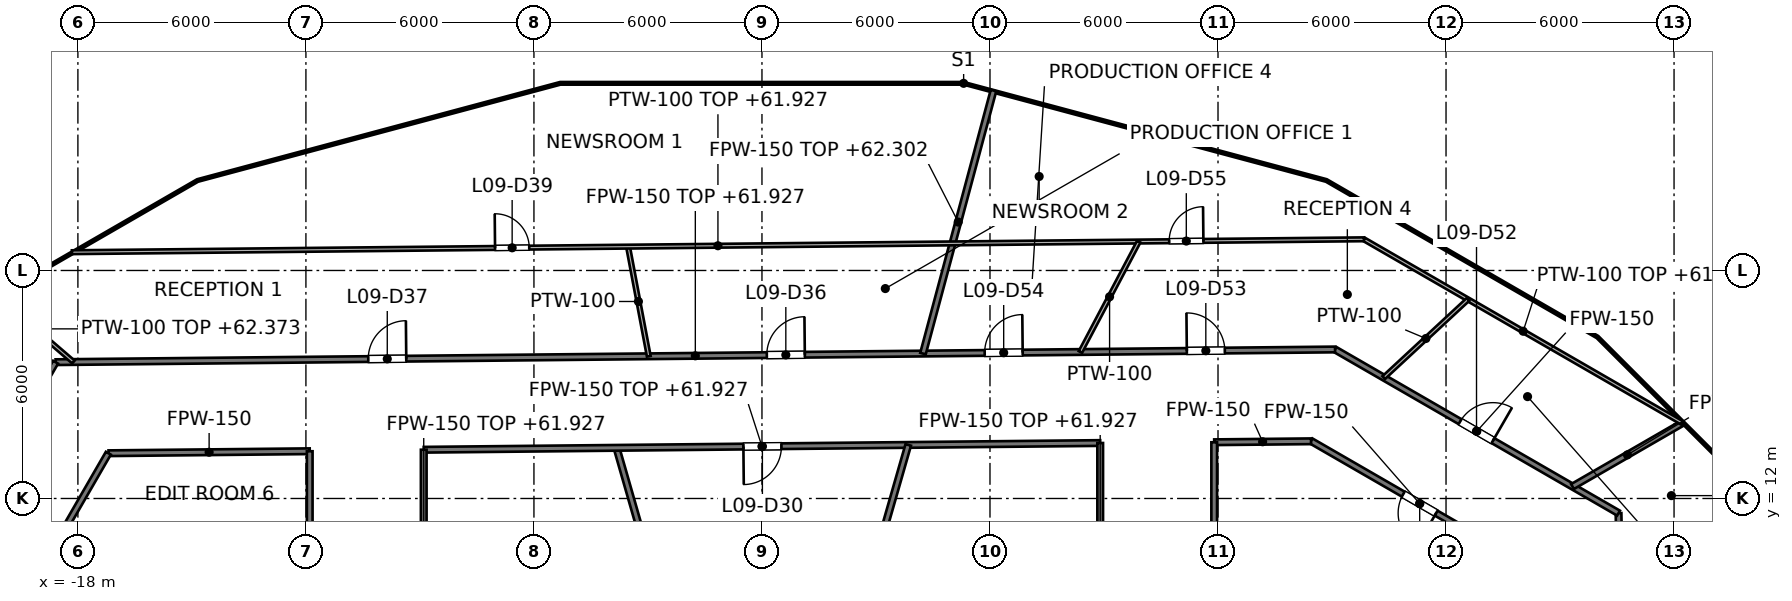
"""IFC4 building model, lengths in metres.
Left out: names, types, materials, properties, quantities, classifications, styles, units other than length and angle.
Written with IfcOpenShell. Run it as: python <this file> out.ifc"""

import sys

from ifc_helpers import new_model, si_unit, direction, frame, frame_2d, origin, place, context, subcontext, project, spatial, rectangle, extrude, element, fill, save


model = new_model("IFC4")
c1 = context("Model", 3, precision=1e-05, world=origin(), true_north=direction((0.0, 1.0)))
c2 = subcontext(c1, "Body", "Model", "MODEL_VIEW")
j1 = project(units=[si_unit("LENGTHUNIT", "METRE"), si_unit("PLANEANGLEUNIT", "RADIAN")], contexts=[c1])
p1 = place(None, origin())
s1 = spatial("IfcSite", under=j1, at=p1, CompositionType="ELEMENT")
p2 = place(p1, origin())
s2 = spatial("IfcBuilding", under=s1, at=p2, CompositionType="ELEMENT")
p3 = place(p2, frame((0.0, 0.0, 58.8)))
s3 = spatial("IfcBuildingStorey", under=s2, at=p3, CompositionType="ELEMENT", Elevation=58.8)
p4 = place(p3, frame((22.539, 11.615, 0.0), z_axis=(0.0, 0.0, 1.0), x_axis=(0.020626332176, -0.99978725458, 0.0)))
e1 = element("IfcWall", 1, at=p4, inside=s3, PredefinedType="PARTITIONING", context=c2, shape_type="SweptSolid", body=[
    extrude(rectangle(XDim=19.66, YDim=0.15, at=frame_2d((9.83, 0.0))), origin(), (0.0, 0.0, 1.0), 3.127),
])
p5 = place(p4, frame((9.33, 0.0, 0.0)))
e2 = element("IfcOpeningElement", 2, at=p5, cuts=e1, PredefinedType="OPENING", context=c2, shape_type="SweptSolid", body=[
    extrude(rectangle(XDim=1.0, YDim=2.1, at=frame_2d((0.5, 1.05))), frame((0.0, 0.075, 0.0), z_axis=(0.0, -1.0, 0.0), x_axis=(1.0, 0.0, 0.0)), (0.0, 0.0, 1.0), 0.15),
])
p6 = place(p3, frame((-3.827, 13.333, 0.0), z_axis=(0.0, 0.0, 1.0), x_axis=(0.275935525478, -0.961176147113, 0.0)))
e3 = element("IfcWall", 3, at=p6, inside=s3, PredefinedType="PARTITIONING", context=c2, shape_type="SweptSolid", body=[
    extrude(rectangle(XDim=5.548, YDim=0.15, at=frame_2d((2.774, 0.0))), origin(), (0.0, 0.0, 1.0), 4.05),
])
p7 = place(p3, frame((14.448, 13.515, 0.0), z_axis=(0.0, 0.0, 1.0), x_axis=(0.866057537452, -0.499944338725, 0.0)))
e4 = element("IfcWall", 4, at=p7, inside=s3, PredefinedType="PARTITIONING", context=c2, shape_type="SweptSolid", body=[
    extrude(rectangle(XDim=6.604, YDim=0.15, at=frame_2d((3.302, 0.0))), origin(), (0.0, 0.0, 1.0), 3.195),
])
p8 = place(p7, frame((2.801, 0.0, 0.0)))
e5 = element("IfcOpeningElement", 5, at=p8, cuts=e4, PredefinedType="OPENING", context=c2, shape_type="SweptSolid", body=[
    extrude(rectangle(XDim=1.0, YDim=2.1, at=frame_2d((0.5, 1.05))), frame((0.0, 0.075, 0.0), z_axis=(0.0, -1.0, 0.0), x_axis=(1.0, 0.0, 0.0)), (0.0, 0.0, 1.0), 0.15),
])
p9 = place(p3, frame((15.08, 15.921, 0.0), z_axis=(0.0, 0.0, 1.0), x_axis=(0.866045387442, -0.499965385693, 0.0)))
e6 = element("IfcWall", 6, at=p9, inside=s3, PredefinedType="PARTITIONING", context=c2, shape_type="SweptSolid", body=[
    extrude(rectangle(XDim=8.612, YDim=0.15, at=frame_2d((4.306, 0.0))), origin(), (0.0, 0.0, 1.0), 3.195),
])
p10 = place(p9, frame((3.798, 0.0, 0.0)))
e7 = element("IfcOpeningElement", 7, at=p10, cuts=e6, PredefinedType="OPENING", context=c2, shape_type="SweptSolid", body=[
    extrude(rectangle(XDim=1.0, YDim=2.1, at=frame_2d((0.5, 1.05))), frame((0.0, 0.075, 0.0), z_axis=(0.0, -1.0, 0.0), x_axis=(1.0, 0.0, 0.0)), (0.0, 0.0, 1.0), 0.15),
])
p11 = place(p3, frame((-17.194, 13.191, 0.0), z_axis=(0.0, 0.0, 1.0), x_axis=(0.999950394899, 0.009960308291, 0.0)))
e8 = element("IfcWall", 8, at=p11, inside=s3, PredefinedType="PARTITIONING", context=c2, shape_type="SweptSolid", body=[
    extrude(rectangle(XDim=5.294, YDim=0.15, at=frame_2d((2.647, 0.0))), origin(), (0.0, 0.0, 1.0), 3.195),
])
p12 = place(p3, frame((-8.9, 13.282, 0.0), z_axis=(0.0, 0.0, 1.0), x_axis=(0.999950697987, 0.009929833562, 0.0)))
e9 = element("IfcWall", 9, at=p12, inside=s3, PredefinedType="PARTITIONING", context=c2, shape_type="SweptSolid", body=[
    extrude(rectangle(XDim=17.801, YDim=0.15, at=frame_2d((8.9, 0.0))), origin(), (0.0, 0.0, 1.0), 3.127),
])
p13 = place(p12, frame((8.412, 0.0, 0.0)))
e10 = element("IfcOpeningElement", 10, at=p13, cuts=e9, PredefinedType="OPENING", context=c2, shape_type="SweptSolid", body=[
    extrude(rectangle(XDim=1.0, YDim=2.1, at=frame_2d((0.5, 1.05))), frame((0.0, 0.075, 0.0), z_axis=(0.0, -1.0, 0.0), x_axis=(1.0, 0.0, 0.0)), (0.0, 0.0, 1.0), 0.15),
])
p14 = place(p3, frame((11.9, 13.48, 0.0), z_axis=(0.0, 0.0, 1.0), x_axis=(0.999950357576, 0.009964054536, 0.0)))
e11 = element("IfcWall", 11, at=p14, inside=s3, PredefinedType="PARTITIONING", context=c2, shape_type="SweptSolid", body=[
    extrude(rectangle(XDim=2.548, YDim=0.15, at=frame_2d((1.274, 0.0))), origin(), (0.0, 0.0, 1.0), 3.195),
])
p15 = place(p3, frame((-18.587, 15.587, 0.0), z_axis=(0.0, 0.0, 1.0), x_axis=(0.99995065417, 0.009934245078, 0.0)))
e12 = element("IfcWall", 12, at=p15, inside=s3, PredefinedType="PARTITIONING", context=c2, shape_type="SweptSolid", body=[
    extrude(rectangle(XDim=33.669, YDim=0.15, at=frame_2d((16.834, 0.0))), origin(), (0.0, 0.0, 1.0), 3.127),
])
p16 = place(p15, frame((18.716, 0.0, 0.0)))
e13 = element("IfcOpeningElement", 13, at=p16, cuts=e12, PredefinedType="OPENING", context=c2, shape_type="SweptSolid", body=[
    extrude(rectangle(XDim=1.0, YDim=2.1, at=frame_2d((0.5, 1.05))), frame((0.0, 0.075, 0.0), z_axis=(0.0, -1.0, 0.0), x_axis=(1.0, 0.0, 0.0)), (0.0, 0.0, 1.0), 0.15),
])
p17 = place(p15, frame((8.228, 0.0, 0.0)))
e14 = element("IfcOpeningElement", 14, at=p17, cuts=e12, PredefinedType="OPENING", context=c2, shape_type="SweptSolid", body=[
    extrude(rectangle(XDim=1.0, YDim=2.1, at=frame_2d((0.5, 1.05))), frame((0.0, 0.075, 0.0), z_axis=(0.0, -1.0, 0.0), x_axis=(1.0, 0.0, 0.0)), (0.0, 0.0, 1.0), 0.15),
])
p18 = place(p15, frame((29.768, 0.0, 0.0)))
e15 = element("IfcOpeningElement", 15, at=p18, cuts=e12, PredefinedType="OPENING", context=c2, shape_type="SweptSolid", body=[
    extrude(rectangle(XDim=1.0, YDim=2.1, at=frame_2d((0.5, 1.05))), frame((0.0, 0.075, 0.0), z_axis=(0.0, -1.0, 0.0), x_axis=(1.0, 0.0, 0.0)), (0.0, 0.0, 1.0), 0.15),
])
p19 = place(p15, frame((24.449, 0.0, 0.0)))
e16 = element("IfcOpeningElement", 16, at=p19, cuts=e12, PredefinedType="OPENING", context=c2, shape_type="SweptSolid", body=[
    extrude(rectangle(XDim=1.0, YDim=2.1, at=frame_2d((0.5, 1.05))), frame((0.0, 0.075, 0.0), z_axis=(0.0, -1.0, 0.0), x_axis=(1.0, 0.0, 0.0)), (0.0, 0.0, 1.0), 0.15),
])
p20 = place(p3, frame((21.328, 12.314, 0.0), z_axis=(0.0, 0.0, 1.0), x_axis=(0.865983350263, 0.500072831762, 0.0)))
e17 = element("IfcWall", 17, at=p20, inside=s3, PredefinedType="PARTITIONING", context=c2, shape_type="SweptSolid", body=[
    extrude(rectangle(XDim=3.337, YDim=0.15, at=frame_2d((1.669, 0.0))), origin(), (0.0, 0.0, 1.0), 3.276),
])
p21 = place(p3, frame((-20.5, 7.474, 0.0), z_axis=(0.0, 0.0, 1.0), x_axis=(0.500012665616, 0.866018091164, 0.0)))
e18 = element("IfcWall", 18, at=p21, inside=s3, PredefinedType="PARTITIONING", context=c2, shape_type="SweptSolid", body=[
    extrude(rectangle(XDim=6.602, YDim=0.15, at=frame_2d((3.301, 0.0))), origin(), (0.0, 0.0, 1.0), 3.195),
])
p22 = place(p21, frame((2.803, 0.0, 0.0)))
e19 = element("IfcOpeningElement", 19, at=p22, cuts=e18, PredefinedType="OPENING", context=c2, shape_type="SweptSolid", body=[
    extrude(rectangle(XDim=1.0, YDim=2.1, at=frame_2d((0.5, 1.05))), frame((0.0, 0.075, 0.0), z_axis=(0.0, -1.0, 0.0), x_axis=(1.0, 0.0, 0.0)), (0.0, 0.0, 1.0), 0.15),
])
p23 = place(p3, frame((-22.9, 8.117, 0.0), z_axis=(0.0, 0.0, 1.0), x_axis=(0.500017275495, 0.866015429543, 0.0)))
e20 = element("IfcWall", 20, at=p23, inside=s3, PredefinedType="PARTITIONING", context=c2, shape_type="SweptSolid", body=[
    extrude(rectangle(XDim=8.626, YDim=0.15, at=frame_2d((4.313, 0.0))), origin(), (0.0, 0.0, 1.0), 3.195),
])
p24 = place(p23, frame((3.813, 0.0, 0.0)))
e21 = element("IfcOpeningElement", 21, at=p24, cuts=e20, PredefinedType="OPENING", context=c2, shape_type="SweptSolid", body=[
    extrude(rectangle(XDim=1.0, YDim=2.1, at=frame_2d((0.5, 1.05))), frame((0.0, 0.075, 0.0), z_axis=(0.0, -1.0, 0.0), x_axis=(1.0, 0.0, 0.0)), (0.0, 0.0, 1.0), 0.15),
])
p25 = place(p3, frame((2.296, 8.0, 0.0), z_axis=(0.0, 0.0, 1.0), x_axis=(0.275958345059, 0.961169595749, 0.0)))
e22 = element("IfcWall", 22, at=p25, inside=s3, PredefinedType="PARTITIONING", context=c2, shape_type="SweptSolid", body=[
    extrude(rectangle(XDim=5.628, YDim=0.15, at=frame_2d((2.814, 0.0))), origin(), (0.0, 0.0, 1.0), 4.05),
])
p26 = place(p3, frame((4.237, 15.813, 0.0), z_axis=(0.0, 0.0, 1.0), x_axis=(0.258845635073, 0.965918701136, 0.0)))
e23 = element("IfcWall", 23, at=p26, inside=s3, PredefinedType="PARTITIONING", context=c2, shape_type="SweptSolid", body=[
    extrude(rectangle(XDim=7.166, YDim=0.15, at=frame_2d((3.583, 0.0))), origin(), (0.0, 0.0, 1.0), 3.502),
])
p27 = place(p3, frame((11.9, 8.0, 0.0), z_axis=(0.0, 0.0, 1.0), x_axis=(0.0, 1.0, 0.0)))
e24 = element("IfcWall", 24, at=p27, inside=s3, PredefinedType="PARTITIONING", context=c2, shape_type="SweptSolid", body=[
    extrude(rectangle(XDim=5.479, YDim=0.15, at=frame_2d((2.74, 0.0))), origin(), (0.0, 0.0, 1.0), 3.195),
])
p28 = place(p3, frame((8.9, 8.0, 0.0), z_axis=(0.0, 0.0, 1.0), x_axis=(0.0, 1.0, 0.0)))
e25 = element("IfcWall", 25, at=p28, inside=s3, PredefinedType="PARTITIONING", context=c2, shape_type="SweptSolid", body=[
    extrude(rectangle(XDim=5.46, YDim=0.15, at=frame_2d((2.73, 0.0))), origin(), (0.0, 0.0, 1.0), 3.127),
])
p29 = place(p28, frame((2.23, 0.0, 0.0)))
e26 = element("IfcOpeningElement", 26, at=p29, cuts=e25, PredefinedType="OPENING", context=c2, shape_type="SweptSolid", body=[
    extrude(rectangle(XDim=1.0, YDim=2.1, at=frame_2d((0.5, 1.05))), frame((0.0, 0.075, 0.0), z_axis=(0.0, -1.0, 0.0), x_axis=(1.0, 0.0, 0.0)), (0.0, 0.0, 1.0), 0.15),
])
p30 = place(p3, frame((-8.9, 8.0, 0.0), z_axis=(0.0, 0.0, 1.0), x_axis=(0.0, 1.0, 0.0)))
e27 = element("IfcWall", 27, at=p30, inside=s3, PredefinedType="PARTITIONING", context=c2, shape_type="SweptSolid", body=[
    extrude(rectangle(XDim=5.283, YDim=0.15, at=frame_2d((2.642, 0.0))), origin(), (0.0, 0.0, 1.0), 3.127),
])
p31 = place(p30, frame((2.142, 0.0, 0.0)))
e28 = element("IfcOpeningElement", 28, at=p31, cuts=e27, PredefinedType="OPENING", context=c2, shape_type="SweptSolid", body=[
    extrude(rectangle(XDim=1.0, YDim=2.1, at=frame_2d((0.5, 1.05))), frame((0.0, 0.075, 0.0), z_axis=(0.0, -1.0, 0.0), x_axis=(1.0, 0.0, 0.0)), (0.0, 0.0, 1.0), 0.15),
])
p32 = place(p3, frame((-11.9, 8.0, 0.0), z_axis=(0.0, 0.0, 1.0), x_axis=(0.0, 1.0, 0.0)))
e29 = element("IfcWall", 29, at=p32, inside=s3, PredefinedType="PARTITIONING", context=c2, shape_type="SweptSolid", body=[
    extrude(rectangle(XDim=5.243, YDim=0.15, at=frame_2d((2.622, 0.0))), origin(), (0.0, 0.0, 1.0), 3.195),
])
p33 = place(p3, frame((-3.524, 18.626, 0.0), z_axis=(0.0, 0.0, 1.0), x_axis=(0.185980649988, -0.982553407113, 0.0)))
e30 = element("IfcWall", 30, at=p33, inside=s3, PredefinedType="PARTITIONING", context=c2, shape_type="SweptSolid", body=[
    extrude(rectangle(XDim=2.935, YDim=0.1, at=frame_2d((1.468, 0.0))), origin(), (0.0, 0.0, 1.0), 4.05),
])
p34 = place(p3, frame((-20.143, 17.335, 0.0), z_axis=(0.0, 0.0, 1.0), x_axis=(0.757945732802, -0.652317611389, 0.0)))
e31 = element("IfcWall", 31, at=p34, inside=s3, PredefinedType="PARTITIONING", context=c2, shape_type="SweptSolid", body=[
    extrude(rectangle(XDim=2.672, YDim=0.1, at=frame_2d((1.336, 0.0))), origin(), (0.0, 0.0, 1.0), 3.573),
])
p35 = place(p3, frame((15.841, 18.819, 0.0), z_axis=(0.0, 0.0, 1.0), x_axis=(0.866064962815, -0.499931475489, 0.0)))
e32 = element("IfcWall", 32, at=p35, inside=s3, PredefinedType="PARTITIONING", context=c2, shape_type="SweptSolid", body=[
    extrude(rectangle(XDim=9.673, YDim=0.1, at=frame_2d((4.836, 0.0))), origin(), (0.0, 0.0, 1.0), 3.195),
])
p36 = place(p3, frame((-18.158, 18.481, 0.0), z_axis=(0.0, 0.0, 1.0), x_axis=(0.999950046819, 0.009995192196, 0.0)))
e33 = element("IfcWall", 33, at=p36, inside=s3, PredefinedType="PARTITIONING", context=c2, shape_type="SweptSolid", body=[
    extrude(rectangle(XDim=34.001, YDim=0.1, at=frame_2d((17.0, 0.0))), origin(), (0.0, 0.0, 1.0), 3.127),
])
p37 = place(p36, frame((11.135, 0.0, 0.0)))
e34 = element("IfcOpeningElement", 34, at=p37, cuts=e33, PredefinedType="OPENING", context=c2, shape_type="SweptSolid", body=[
    extrude(rectangle(XDim=0.9, YDim=2.1, at=frame_2d((0.45, 1.05))), frame((0.0, 0.05, 0.0), z_axis=(0.0, -1.0, 0.0), x_axis=(1.0, 0.0, 0.0)), (0.0, 0.0, 1.0), 0.1),
])
p38 = place(p36, frame((28.875, 0.0, 0.0)))
e35 = element("IfcOpeningElement", 35, at=p38, cuts=e33, PredefinedType="OPENING", context=c2, shape_type="SweptSolid", body=[
    extrude(rectangle(XDim=0.9, YDim=2.1, at=frame_2d((0.45, 1.05))), frame((0.0, 0.05, 0.0), z_axis=(0.0, -1.0, 0.0), x_axis=(1.0, 0.0, 0.0)), (0.0, 0.0, 1.0), 0.1),
])
p39 = place(p3, frame((16.361, 15.181, 0.0), z_axis=(0.0, 0.0, 1.0), x_axis=(0.733037714786, 0.680187995117, 0.0)))
e36 = element("IfcWall", 36, at=p39, inside=s3, PredefinedType="PARTITIONING", context=c2, shape_type="SweptSolid", body=[
    extrude(rectangle(XDim=3.026, YDim=0.1, at=frame_2d((1.513, 0.0))), origin(), (0.0, 0.0, 1.0), 4.05),
])
p40 = place(p3, frame((8.379, 15.855, 0.0), z_axis=(0.0, 0.0, 1.0), x_axis=(0.467454152029, 0.884017316432, 0.0)))
e37 = element("IfcWall", 37, at=p40, inside=s3, PredefinedType="PARTITIONING", context=c2, shape_type="SweptSolid", body=[
    extrude(rectangle(XDim=3.286, YDim=0.1, at=frame_2d((1.643, 0.0))), origin(), (0.0, 0.0, 1.0), 4.05),
])
p41 = place(p8, origin())
e38 = element("IfcDoor", 38, at=p41, inside=s3, OperationType="SINGLE_SWING_RIGHT", PredefinedType="DOOR", context=c2, shape_type="SweptSolid", body=[
    extrude(rectangle(XDim=1.0, YDim=2.1, at=frame_2d((0.5, 1.05))), frame((0.0, 0.025, 0.0), z_axis=(0.0, -1.0, 0.0), x_axis=(1.0, 0.0, 0.0)), (0.0, 0.0, 1.0), 0.05),
])
fill(e5, e38)
p42 = place(p13, origin())
e39 = element("IfcDoor", 39, at=p42, inside=s3, OperationType="SINGLE_SWING_LEFT", PredefinedType="DOOR", context=c2, shape_type="SweptSolid", body=[
    extrude(rectangle(XDim=1.0, YDim=2.1, at=frame_2d((0.5, 1.05))), frame((0.0, 0.025, 0.0), z_axis=(0.0, -1.0, 0.0), x_axis=(1.0, 0.0, 0.0)), (0.0, 0.0, 1.0), 0.05),
])
fill(e10, e39)
p43 = place(p16, origin())
e40 = element("IfcDoor", 40, at=p43, inside=s3, OperationType="SINGLE_SWING_RIGHT", PredefinedType="DOOR", context=c2, shape_type="SweptSolid", body=[
    extrude(rectangle(XDim=1.0, YDim=2.1, at=frame_2d((0.5, 1.05))), frame((0.0, 0.025, 0.0), z_axis=(0.0, -1.0, 0.0), x_axis=(1.0, 0.0, 0.0)), (0.0, 0.0, 1.0), 0.05),
])
fill(e13, e40)
p44 = place(p17, origin())
e41 = element("IfcDoor", 41, at=p44, inside=s3, OperationType="SINGLE_SWING_RIGHT", PredefinedType="DOOR", context=c2, shape_type="SweptSolid", body=[
    extrude(rectangle(XDim=1.0, YDim=2.1, at=frame_2d((0.5, 1.05))), frame((0.0, 0.025, 0.0), z_axis=(0.0, -1.0, 0.0), x_axis=(1.0, 0.0, 0.0)), (0.0, 0.0, 1.0), 0.05),
])
fill(e14, e41)
p45 = place(p37, origin())
e42 = element("IfcDoor", 42, at=p45, inside=s3, OperationType="SINGLE_SWING_LEFT", PredefinedType="DOOR", context=c2, shape_type="SweptSolid", body=[
    extrude(rectangle(XDim=0.9, YDim=2.1, at=frame_2d((0.45, 1.05))), frame((0.0, 0.025, 0.0), z_axis=(0.0, -1.0, 0.0), x_axis=(1.0, 0.0, 0.0)), (0.0, 0.0, 1.0), 0.05),
])
fill(e34, e42)
p46 = place(p10, origin())
e43 = element("IfcDoor", 43, at=p46, inside=s3, OperationType="SINGLE_SWING_RIGHT", PredefinedType="DOOR", context=c2, shape_type="SweptSolid", body=[
    extrude(rectangle(XDim=1.0, YDim=2.1, at=frame_2d((0.5, 1.05))), frame((0.0, 0.025, 0.0), z_axis=(0.0, -1.0, 0.0), x_axis=(1.0, 0.0, 0.0)), (0.0, 0.0, 1.0), 0.05),
])
fill(e7, e43)
p47 = place(p18, origin())
e44 = element("IfcDoor", 44, at=p47, inside=s3, OperationType="SINGLE_SWING_LEFT", PredefinedType="DOOR", context=c2, shape_type="SweptSolid", body=[
    extrude(rectangle(XDim=1.0, YDim=2.1, at=frame_2d((0.5, 1.05))), frame((0.0, 0.025, 0.0), z_axis=(0.0, -1.0, 0.0), x_axis=(1.0, 0.0, 0.0)), (0.0, 0.0, 1.0), 0.05),
])
fill(e15, e44)
p48 = place(p19, origin())
e45 = element("IfcDoor", 45, at=p48, inside=s3, OperationType="SINGLE_SWING_RIGHT", PredefinedType="DOOR", context=c2, shape_type="SweptSolid", body=[
    extrude(rectangle(XDim=1.0, YDim=2.1, at=frame_2d((0.5, 1.05))), frame((0.0, 0.025, 0.0), z_axis=(0.0, -1.0, 0.0), x_axis=(1.0, 0.0, 0.0)), (0.0, 0.0, 1.0), 0.05),
])
fill(e16, e45)
p49 = place(p38, origin())
e46 = element("IfcDoor", 46, at=p49, inside=s3, OperationType="SINGLE_SWING_RIGHT", PredefinedType="DOOR", context=c2, shape_type="SweptSolid", body=[
    extrude(rectangle(XDim=0.9, YDim=2.1, at=frame_2d((0.45, 1.05))), frame((0.0, 0.025, 0.0), z_axis=(0.0, -1.0, 0.0), x_axis=(1.0, 0.0, 0.0)), (0.0, 0.0, 1.0), 0.05),
])
fill(e35, e46)
save(model, sys.argv[1])
